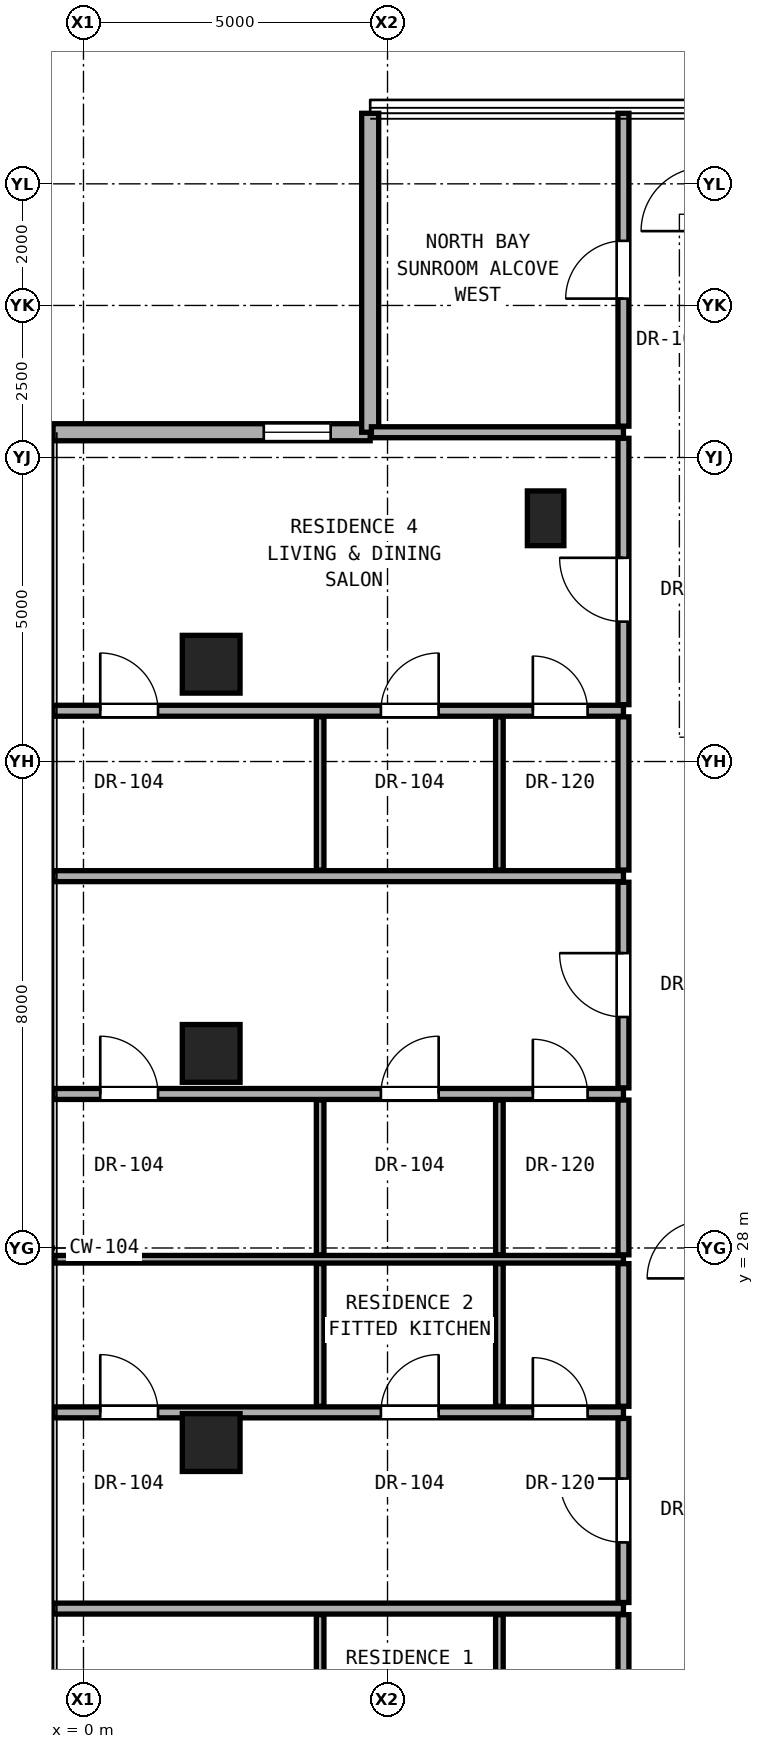
"""IFC4 building model, lengths in metres.
Left out: names, types, materials, properties, quantities, classifications, styles, units other than length and angle.
Written with IfcOpenShell. Run it as: python <this file> out.ifc"""

import sys

from ifc_helpers import new_model, si_unit, direction, frame, frame_2d, origin, origin_2d, place, context, subcontext, project, spatial, rectangle, hollow_rectangle, extrude, element, fill, save


model = new_model("IFC4")
c1 = context("Model", 3, precision=1e-05, world=origin(), true_north=direction((0.0, 1.0)))
c2 = subcontext(c1, "Body", "Model", "MODEL_VIEW")
j1 = project(units=[si_unit("LENGTHUNIT", "METRE"), si_unit("PLANEANGLEUNIT", "RADIAN")], contexts=[c1])
p1 = place(None, origin())
s1 = spatial("IfcSite", under=j1, at=p1, CompositionType="ELEMENT")
p2 = place(p1, origin())
s2 = spatial("IfcBuilding", under=s1, at=p2, CompositionType="ELEMENT")
p3 = place(p2, frame((0.0, 0.0, 170.65)))
s3 = spatial("IfcBuildingStorey", under=s2, at=p3, CompositionType="ELEMENT", Elevation=170.65)
for number, where, z_axis, x_axis in (
    (1, (2.1, 24.8, 0.0), (0.0, 0.0, 1.0), (1.0, 0.0, 0.0)),
    (2, (2.1, 31.2, 0.0), (0.0, 0.0, 1.0), (1.0, 0.0, 0.0)),
    (3, (2.1, 37.6, 0.0), (0.0, 0.0, 1.0), (1.0, 0.0, 0.0)),
):
    element("IfcColumn", number, at=place(p3, frame(where, z_axis=z_axis, x_axis=x_axis)), inside=s3, PredefinedType="COLUMN", context=c2, shape_type="SweptSolid", body=[
        extrude(hollow_rectangle(XDim=0.95, YDim=0.95, WallThickness=0.05, at=origin_2d()), origin(), (0.0, 0.0, 1.0), 3.25),
    ])
p4 = place(p3, frame((7.6, 40.0, 0.0), z_axis=(0.0, 0.0, 1.0), x_axis=(1.0, 0.0, 0.0)))
e4 = element("IfcColumn", 4, at=p4, inside=s3, PredefinedType="PILASTER", context=c2, shape_type="SweptSolid", body=[
    extrude(rectangle(XDim=0.6, YDim=0.9, at=origin_2d()), origin(), (0.0, 0.0, 1.0), 3.25),
])
p5 = place(p3, frame((4.715, 41.415, 0.0), z_axis=(0.0, 0.0, 1.0), x_axis=(-1.0, 0.0, 0.0)))
e5 = element("IfcWall", 5, at=p5, inside=s3, PredefinedType="SOLIDWALL", context=c2, shape_type="SweptSolid", body=[
    extrude(rectangle(XDim=5.245, YDim=0.28, at=frame_2d((2.623, 0.0))), origin(), (0.0, 0.0, 1.0), 3.03),
])
p6 = place(p5, frame((0.65, 0.0, 0.85)))
e6 = element("IfcOpeningElement", 6, at=p6, cuts=e5, PredefinedType="OPENING", context=c2, shape_type="SweptSolid", body=[
    extrude(rectangle(XDim=1.1, YDim=2.0, at=frame_2d((0.55, 1.0))), frame((0.0, 0.15, 0.0), z_axis=(0.0, -1.0, 0.0), x_axis=(1.0, 0.0, 0.0)), (0.0, 0.0, 1.0), 0.3),
])
p7 = place(p3, frame((4.715, 46.66, 0.0), z_axis=(0.0, 0.0, 1.0), x_axis=(0.0, -1.0, 0.0)))
e7 = element("IfcWall", 7, at=p7, inside=s3, PredefinedType="SOLIDWALL", context=c2, shape_type="SweptSolid", body=[
    extrude(rectangle(XDim=5.245, YDim=0.28, at=frame_2d((2.623, 0.0))), origin(), (0.0, 0.0, 1.0), 3.03),
])
p8 = place(p3, frame((-0.53, 22.07, 0.0), z_axis=(0.0, 0.0, 1.0), x_axis=(1.0, 0.0, 0.0)))
e8 = element("IfcWall", 8, at=p8, inside=s3, PredefinedType="PARTITIONING", context=c2, shape_type="SweptSolid", body=[
    extrude(rectangle(XDim=9.41, YDim=0.18, at=frame_2d((4.705, 0.0))), origin(), (0.0, 0.0, 1.0), 2.269),
])
p9 = place(p3, frame((-0.53, 25.297, 0.0), z_axis=(0.0, 0.0, 1.0), x_axis=(1.0, 0.0, 0.0)))
e9 = element("IfcWall", 9, at=p9, inside=s3, PredefinedType="PARTITIONING", context=c2, shape_type="SweptSolid", body=[
    extrude(rectangle(XDim=9.41, YDim=0.18, at=frame_2d((4.705, 0.0))), origin(), (0.0, 0.0, 1.0), 2.269),
])
p10 = place(p9, frame((0.806, 0.0, 0.0)))
e10 = element("IfcOpeningElement", 10, at=p10, cuts=e9, PredefinedType="OPENING", context=c2, shape_type="SweptSolid", body=[
    extrude(rectangle(XDim=0.95, YDim=2.15, at=frame_2d((0.475, 1.075))), frame((0.0, 0.1, 0.0), z_axis=(0.0, -1.0, 0.0), x_axis=(1.0, 0.0, 0.0)), (0.0, 0.0, 1.0), 0.2),
])
p11 = place(p9, frame((5.421, 0.0, 0.0)))
e11 = element("IfcOpeningElement", 11, at=p11, cuts=e9, PredefinedType="OPENING", context=c2, shape_type="SweptSolid", body=[
    extrude(rectangle(XDim=0.95, YDim=2.15, at=frame_2d((0.475, 1.075))), frame((0.0, 0.1, 0.0), z_axis=(0.0, -1.0, 0.0), x_axis=(1.0, 0.0, 0.0)), (0.0, 0.0, 1.0), 0.2),
])
p12 = place(p9, frame((7.92, 0.0, 0.0)))
e12 = element("IfcOpeningElement", 12, at=p12, cuts=e9, PredefinedType="OPENING", context=c2, shape_type="SweptSolid", body=[
    extrude(rectangle(XDim=0.9, YDim=2.1, at=frame_2d((0.45, 1.05))), frame((0.0, 0.1, 0.0), z_axis=(0.0, -1.0, 0.0), x_axis=(1.0, 0.0, 0.0)), (0.0, 0.0, 1.0), 0.2),
])
p13 = place(p3, frame((-0.53, 27.815, 0.0), z_axis=(0.0, 0.0, 1.0), x_axis=(1.0, 0.0, 0.0)))
e13 = element("IfcWall", 13, at=p13, inside=s3, PredefinedType="PARTITIONING", context=c2, shape_type="SweptSolid", body=[
    extrude(rectangle(XDim=9.41, YDim=0.125, at=frame_2d((4.705, 0.0))), origin(), (0.0, 0.0, 1.0), 2.269),
])
p14 = place(p3, frame((-0.53, 30.533, 0.0), z_axis=(0.0, 0.0, 1.0), x_axis=(1.0, 0.0, 0.0)))
e14 = element("IfcWall", 14, at=p14, inside=s3, PredefinedType="PARTITIONING", context=c2, shape_type="SweptSolid", body=[
    extrude(rectangle(XDim=9.41, YDim=0.18, at=frame_2d((4.705, 0.0))), origin(), (0.0, 0.0, 1.0), 2.269),
])
p15 = place(p14, frame((0.806, 0.0, 0.0)))
e15 = element("IfcOpeningElement", 15, at=p15, cuts=e14, PredefinedType="OPENING", context=c2, shape_type="SweptSolid", body=[
    extrude(rectangle(XDim=0.95, YDim=2.15, at=frame_2d((0.475, 1.075))), frame((0.0, 0.1, 0.0), z_axis=(0.0, -1.0, 0.0), x_axis=(1.0, 0.0, 0.0)), (0.0, 0.0, 1.0), 0.2),
])
p16 = place(p14, frame((5.421, 0.0, 0.0)))
e16 = element("IfcOpeningElement", 16, at=p16, cuts=e14, PredefinedType="OPENING", context=c2, shape_type="SweptSolid", body=[
    extrude(rectangle(XDim=0.95, YDim=2.15, at=frame_2d((0.475, 1.075))), frame((0.0, 0.1, 0.0), z_axis=(0.0, -1.0, 0.0), x_axis=(1.0, 0.0, 0.0)), (0.0, 0.0, 1.0), 0.2),
])
p17 = place(p14, frame((7.92, 0.0, 0.0)))
e17 = element("IfcOpeningElement", 17, at=p17, cuts=e14, PredefinedType="OPENING", context=c2, shape_type="SweptSolid", body=[
    extrude(rectangle(XDim=0.9, YDim=2.1, at=frame_2d((0.45, 1.05))), frame((0.0, 0.1, 0.0), z_axis=(0.0, -1.0, 0.0), x_axis=(1.0, 0.0, 0.0)), (0.0, 0.0, 1.0), 0.2),
])
p18 = place(p3, frame((-0.53, 34.115, 0.0), z_axis=(0.0, 0.0, 1.0), x_axis=(1.0, 0.0, 0.0)))
e18 = element("IfcWall", 18, at=p18, inside=s3, PredefinedType="PARTITIONING", context=c2, shape_type="SweptSolid", body=[
    extrude(rectangle(XDim=9.41, YDim=0.18, at=frame_2d((4.705, 0.0))), origin(), (0.0, 0.0, 1.0), 2.269),
])
p19 = place(p3, frame((-0.53, 36.835, 0.0), z_axis=(0.0, 0.0, 1.0), x_axis=(1.0, 0.0, 0.0)))
e19 = element("IfcWall", 19, at=p19, inside=s3, PredefinedType="PARTITIONING", context=c2, shape_type="SweptSolid", body=[
    extrude(rectangle(XDim=9.41, YDim=0.18, at=frame_2d((4.705, 0.0))), origin(), (0.0, 0.0, 1.0), 2.269),
])
p20 = place(p19, frame((0.806, 0.0, 0.0)))
e20 = element("IfcOpeningElement", 20, at=p20, cuts=e19, PredefinedType="OPENING", context=c2, shape_type="SweptSolid", body=[
    extrude(rectangle(XDim=0.95, YDim=2.15, at=frame_2d((0.475, 1.075))), frame((0.0, 0.1, 0.0), z_axis=(0.0, -1.0, 0.0), x_axis=(1.0, 0.0, 0.0)), (0.0, 0.0, 1.0), 0.2),
])
p21 = place(p19, frame((5.421, 0.0, 0.0)))
e21 = element("IfcOpeningElement", 21, at=p21, cuts=e19, PredefinedType="OPENING", context=c2, shape_type="SweptSolid", body=[
    extrude(rectangle(XDim=0.95, YDim=2.15, at=frame_2d((0.475, 1.075))), frame((0.0, 0.1, 0.0), z_axis=(0.0, -1.0, 0.0), x_axis=(1.0, 0.0, 0.0)), (0.0, 0.0, 1.0), 0.2),
])
p22 = place(p19, frame((7.92, 0.0, 0.0)))
e22 = element("IfcOpeningElement", 22, at=p22, cuts=e19, PredefinedType="OPENING", context=c2, shape_type="SweptSolid", body=[
    extrude(rectangle(XDim=0.9, YDim=2.1, at=frame_2d((0.45, 1.05))), frame((0.0, 0.1, 0.0), z_axis=(0.0, -1.0, 0.0), x_axis=(1.0, 0.0, 0.0)), (0.0, 0.0, 1.0), 0.2),
])
p23 = place(p3, frame((4.735, 41.415, 0.0), z_axis=(0.0, 0.0, 1.0), x_axis=(1.0, 0.0, 0.0)))
e23 = element("IfcWall", 23, at=p23, inside=s3, PredefinedType="PARTITIONING", context=c2, shape_type="SweptSolid", body=[
    extrude(rectangle(XDim=4.145, YDim=0.18, at=frame_2d((2.072, 0.0))), origin(), (0.0, 0.0, 1.0), 3.05),
])
p24 = place(p3, frame((3.892, 19.45, 0.0), z_axis=(0.0, 0.0, 1.0), x_axis=(0.0, 1.0, 0.0)))
e24 = element("IfcWall", 24, at=p24, inside=s3, PredefinedType="PARTITIONING", context=c2, shape_type="SweptSolid", body=[
    extrude(rectangle(XDim=2.52, YDim=0.125, at=frame_2d((1.26, 0.0))), origin(), (0.0, 0.0, 1.0), 3.05),
])
p25 = place(p3, frame((3.892, 25.397, 0.0), z_axis=(0.0, 0.0, 1.0), x_axis=(0.0, 1.0, 0.0)))
e25 = element("IfcWall", 25, at=p25, inside=s3, PredefinedType="PARTITIONING", context=c2, shape_type="SweptSolid", body=[
    extrude(rectangle(XDim=2.345, YDim=0.125, at=frame_2d((1.173, 0.0))), origin(), (0.0, 0.0, 1.0), 3.05),
])
p26 = place(p3, frame((3.892, 27.887, 0.0), z_axis=(0.0, 0.0, 1.0), x_axis=(0.0, 1.0, 0.0)))
e26 = element("IfcWall", 26, at=p26, inside=s3, PredefinedType="PARTITIONING", context=c2, shape_type="SweptSolid", body=[
    extrude(rectangle(XDim=2.546, YDim=0.125, at=frame_2d((1.273, 0.0))), origin(), (0.0, 0.0, 1.0), 3.05),
])
for number, where, z_axis, x_axis in (
    (27, (3.892, 34.215, 0.0), (0.0, 0.0, 1.0), (0.0, 1.0, 0.0)),
    (28, (6.84, 19.45, 0.0), (0.0, 0.0, 1.0), (0.0, 1.0, 0.0)),
):
    element("IfcWall", number, at=place(p3, frame(where, z_axis=z_axis, x_axis=x_axis)), inside=s3, PredefinedType="PARTITIONING", context=c2, shape_type="SweptSolid", body=[
        extrude(rectangle(XDim=2.52, YDim=0.125, at=frame_2d((1.26, 0.0))), origin(), (0.0, 0.0, 1.0), 3.05),
    ])
p27 = place(p3, frame((6.84, 25.397, 0.0), z_axis=(0.0, 0.0, 1.0), x_axis=(0.0, 1.0, 0.0)))
e29 = element("IfcWall", 29, at=p27, inside=s3, PredefinedType="PARTITIONING", context=c2, shape_type="SweptSolid", body=[
    extrude(rectangle(XDim=2.345, YDim=0.125, at=frame_2d((1.173, 0.0))), origin(), (0.0, 0.0, 1.0), 3.05),
])
p28 = place(p3, frame((6.84, 27.887, 0.0), z_axis=(0.0, 0.0, 1.0), x_axis=(0.0, 1.0, 0.0)))
e30 = element("IfcWall", 30, at=p28, inside=s3, PredefinedType="PARTITIONING", context=c2, shape_type="SweptSolid", body=[
    extrude(rectangle(XDim=2.546, YDim=0.125, at=frame_2d((1.273, 0.0))), origin(), (0.0, 0.0, 1.0), 3.05),
])
p29 = place(p3, frame((6.84, 34.215, 0.0), z_axis=(0.0, 0.0, 1.0), x_axis=(0.0, 1.0, 0.0)))
e31 = element("IfcWall", 31, at=p29, inside=s3, PredefinedType="PARTITIONING", context=c2, shape_type="SweptSolid", body=[
    extrude(rectangle(XDim=2.52, YDim=0.125, at=frame_2d((1.26, 0.0))), origin(), (0.0, 0.0, 1.0), 3.05),
])
p30 = place(p3, frame((8.88, 19.45, 0.0), z_axis=(0.0, 0.0, 1.0), x_axis=(0.0, 1.0, 0.0)))
e32 = element("IfcWall", 32, at=p30, inside=s3, PredefinedType="PARTITIONING", context=c2, shape_type="SweptSolid", body=[
    extrude(rectangle(XDim=2.52, YDim=0.18, at=frame_2d((1.26, 0.0))), origin(), (0.0, 0.0, 1.0), 3.05),
])
p31 = place(p3, frame((8.88, 22.17, 0.0), z_axis=(0.0, 0.0, 1.0), x_axis=(0.0, 1.0, 0.0)))
e33 = element("IfcWall", 33, at=p31, inside=s3, PredefinedType="PARTITIONING", context=c2, shape_type="SweptSolid", body=[
    extrude(rectangle(XDim=3.027, YDim=0.18, at=frame_2d((1.514, 0.0))), origin(), (0.0, 0.0, 1.0), 2.346),
])
p32 = place(p31, frame((0.989, 0.0, 0.0)))
e34 = element("IfcOpeningElement", 34, at=p32, cuts=e33, PredefinedType="OPENING", context=c2, shape_type="SweptSolid", body=[
    extrude(rectangle(XDim=1.05, YDim=2.2, at=frame_2d((0.525, 1.1))), frame((0.0, 0.1, 0.0), z_axis=(0.0, -1.0, 0.0), x_axis=(1.0, 0.0, 0.0)), (0.0, 0.0, 1.0), 0.2),
])
p33 = place(p3, frame((8.88, 25.397, 0.0), z_axis=(0.0, 0.0, 1.0), x_axis=(0.0, 1.0, 0.0)))
e35 = element("IfcWall", 35, at=p33, inside=s3, PredefinedType="PARTITIONING", context=c2, shape_type="SweptSolid", body=[
    extrude(rectangle(XDim=2.345, YDim=0.18, at=frame_2d((1.173, 0.0))), origin(), (0.0, 0.0, 1.0), 3.05),
])
p34 = place(p3, frame((8.88, 27.887, 0.0), z_axis=(0.0, 0.0, 1.0), x_axis=(0.0, 1.0, 0.0)))
e36 = element("IfcWall", 36, at=p34, inside=s3, PredefinedType="PARTITIONING", context=c2, shape_type="SweptSolid", body=[
    extrude(rectangle(XDim=2.546, YDim=0.18, at=frame_2d((1.273, 0.0))), origin(), (0.0, 0.0, 1.0), 3.05),
])
p35 = place(p3, frame((8.88, 30.633, 0.0), z_axis=(0.0, 0.0, 1.0), x_axis=(0.0, 1.0, 0.0)))
e37 = element("IfcWall", 37, at=p35, inside=s3, PredefinedType="PARTITIONING", context=c2, shape_type="SweptSolid", body=[
    extrude(rectangle(XDim=3.382, YDim=0.18, at=frame_2d((1.691, 0.0))), origin(), (0.0, 0.0, 1.0), 2.346),
])
p36 = place(p35, frame((1.166, 0.0, 0.0)))
e38 = element("IfcOpeningElement", 38, at=p36, cuts=e37, PredefinedType="OPENING", context=c2, shape_type="SweptSolid", body=[
    extrude(rectangle(XDim=1.05, YDim=2.2, at=frame_2d((0.525, 1.1))), frame((0.0, 0.1, 0.0), z_axis=(0.0, -1.0, 0.0), x_axis=(1.0, 0.0, 0.0)), (0.0, 0.0, 1.0), 0.2),
])
p37 = place(p3, frame((8.88, 34.215, 0.0), z_axis=(0.0, 0.0, 1.0), x_axis=(0.0, 1.0, 0.0)))
e39 = element("IfcWall", 39, at=p37, inside=s3, PredefinedType="PARTITIONING", context=c2, shape_type="SweptSolid", body=[
    extrude(rectangle(XDim=2.52, YDim=0.18, at=frame_2d((1.26, 0.0))), origin(), (0.0, 0.0, 1.0), 3.05),
])
p38 = place(p3, frame((8.88, 36.935, 0.0), z_axis=(0.0, 0.0, 1.0), x_axis=(0.0, 1.0, 0.0)))
e40 = element("IfcWall", 40, at=p38, inside=s3, PredefinedType="PARTITIONING", context=c2, shape_type="SweptSolid", body=[
    extrude(rectangle(XDim=4.38, YDim=0.18, at=frame_2d((2.19, 0.0))), origin(), (0.0, 0.0, 1.0), 2.442),
])
p39 = place(p38, frame((1.365, 0.0, 0.0)))
e41 = element("IfcOpeningElement", 41, at=p39, cuts=e40, PredefinedType="OPENING", context=c2, shape_type="SweptSolid", body=[
    extrude(rectangle(XDim=1.05, YDim=2.2, at=frame_2d((0.525, 1.1))), frame((0.0, 0.1, 0.0), z_axis=(0.0, -1.0, 0.0), x_axis=(1.0, 0.0, 0.0)), (0.0, 0.0, 1.0), 0.2),
])
p40 = place(p3, frame((8.88, 41.515, 0.0), z_axis=(0.0, 0.0, 1.0), x_axis=(0.0, 1.0, 0.0)))
e42 = element("IfcWall", 42, at=p40, inside=s3, PredefinedType="PARTITIONING", context=c2, shape_type="SweptSolid", body=[
    extrude(rectangle(XDim=5.145, YDim=0.18, at=frame_2d((2.573, 0.0))), origin(), (0.0, 0.0, 1.0), 3.05),
])
p41 = place(p40, frame((2.097, 0.0, 0.0)))
e43 = element("IfcOpeningElement", 43, at=p41, cuts=e42, PredefinedType="OPENING", context=c2, shape_type="SweptSolid", body=[
    extrude(rectangle(XDim=0.95, YDim=2.15, at=frame_2d((0.475, 1.075))), frame((0.0, 0.1, 0.0), z_axis=(0.0, -1.0, 0.0), x_axis=(1.0, 0.0, 0.0)), (0.0, 0.0, 1.0), 0.2),
])
p42 = place(p6, origin())
e44 = element("IfcWindow", 44, at=p42, inside=s3, PartitioningType="SINGLE_PANEL", PredefinedType="WINDOW", context=c2, shape_type="SweptSolid", body=[
    extrude(rectangle(XDim=1.1, YDim=2.0, at=frame_2d((0.55, 1.0))), frame((0.0, 0.03, 0.0), z_axis=(0.0, -1.0, 0.0), x_axis=(1.0, 0.0, 0.0)), (0.0, 0.0, 1.0), 0.06),
])
fill(e6, e44)
p43 = place(p32, origin())
e45 = element("IfcDoor", 45, at=p43, inside=s3, OperationType="SINGLE_SWING_RIGHT", PredefinedType="DOOR", context=c2, shape_type="SweptSolid", body=[
    extrude(rectangle(XDim=1.05, YDim=2.2, at=frame_2d((0.525, 1.1))), frame((0.0, 0.025, 0.0), z_axis=(0.0, -1.0, 0.0), x_axis=(1.0, 0.0, 0.0)), (0.0, 0.0, 1.0), 0.05),
])
fill(e34, e45)
p44 = place(p10, origin())
e46 = element("IfcDoor", 46, at=p44, inside=s3, OperationType="SINGLE_SWING_LEFT", PredefinedType="DOOR", context=c2, shape_type="SweptSolid", body=[
    extrude(rectangle(XDim=0.95, YDim=2.15, at=frame_2d((0.475, 1.075))), frame((0.0, 0.025, 0.0), z_axis=(0.0, -1.0, 0.0), x_axis=(1.0, 0.0, 0.0)), (0.0, 0.0, 1.0), 0.05),
])
fill(e10, e46)
p45 = place(p11, origin())
e47 = element("IfcDoor", 47, at=p45, inside=s3, OperationType="SINGLE_SWING_RIGHT", PredefinedType="DOOR", context=c2, shape_type="SweptSolid", body=[
    extrude(rectangle(XDim=0.95, YDim=2.15, at=frame_2d((0.475, 1.075))), frame((0.0, 0.025, 0.0), z_axis=(0.0, -1.0, 0.0), x_axis=(1.0, 0.0, 0.0)), (0.0, 0.0, 1.0), 0.05),
])
fill(e11, e47)
p46 = place(p12, origin())
e48 = element("IfcDoor", 48, at=p46, inside=s3, OperationType="SINGLE_SWING_LEFT", PredefinedType="DOOR", context=c2, shape_type="SweptSolid", body=[
    extrude(rectangle(XDim=0.9, YDim=2.1, at=frame_2d((0.45, 1.05))), frame((0.0, 0.025, 0.0), z_axis=(0.0, -1.0, 0.0), x_axis=(1.0, 0.0, 0.0)), (0.0, 0.0, 1.0), 0.05),
])
fill(e12, e48)
p47 = place(p36, origin())
e49 = element("IfcDoor", 49, at=p47, inside=s3, OperationType="SINGLE_SWING_RIGHT", PredefinedType="DOOR", context=c2, shape_type="SweptSolid", body=[
    extrude(rectangle(XDim=1.05, YDim=2.2, at=frame_2d((0.525, 1.1))), frame((0.0, 0.025, 0.0), z_axis=(0.0, -1.0, 0.0), x_axis=(1.0, 0.0, 0.0)), (0.0, 0.0, 1.0), 0.05),
])
fill(e38, e49)
p48 = place(p15, origin())
e50 = element("IfcDoor", 50, at=p48, inside=s3, OperationType="SINGLE_SWING_LEFT", PredefinedType="DOOR", context=c2, shape_type="SweptSolid", body=[
    extrude(rectangle(XDim=0.95, YDim=2.15, at=frame_2d((0.475, 1.075))), frame((0.0, 0.025, 0.0), z_axis=(0.0, -1.0, 0.0), x_axis=(1.0, 0.0, 0.0)), (0.0, 0.0, 1.0), 0.05),
])
fill(e15, e50)
p49 = place(p16, origin())
e51 = element("IfcDoor", 51, at=p49, inside=s3, OperationType="SINGLE_SWING_RIGHT", PredefinedType="DOOR", context=c2, shape_type="SweptSolid", body=[
    extrude(rectangle(XDim=0.95, YDim=2.15, at=frame_2d((0.475, 1.075))), frame((0.0, 0.025, 0.0), z_axis=(0.0, -1.0, 0.0), x_axis=(1.0, 0.0, 0.0)), (0.0, 0.0, 1.0), 0.05),
])
fill(e16, e51)
p50 = place(p17, origin())
e52 = element("IfcDoor", 52, at=p50, inside=s3, OperationType="SINGLE_SWING_LEFT", PredefinedType="DOOR", context=c2, shape_type="SweptSolid", body=[
    extrude(rectangle(XDim=0.9, YDim=2.1, at=frame_2d((0.45, 1.05))), frame((0.0, 0.025, 0.0), z_axis=(0.0, -1.0, 0.0), x_axis=(1.0, 0.0, 0.0)), (0.0, 0.0, 1.0), 0.05),
])
fill(e17, e52)
p51 = place(p39, origin())
e53 = element("IfcDoor", 53, at=p51, inside=s3, OperationType="SINGLE_SWING_RIGHT", PredefinedType="DOOR", context=c2, shape_type="SweptSolid", body=[
    extrude(rectangle(XDim=1.05, YDim=2.2, at=frame_2d((0.525, 1.1))), frame((0.0, 0.025, 0.0), z_axis=(0.0, -1.0, 0.0), x_axis=(1.0, 0.0, 0.0)), (0.0, 0.0, 1.0), 0.05),
])
fill(e41, e53)
p52 = place(p20, origin())
e54 = element("IfcDoor", 54, at=p52, inside=s3, OperationType="SINGLE_SWING_LEFT", PredefinedType="DOOR", context=c2, shape_type="SweptSolid", body=[
    extrude(rectangle(XDim=0.95, YDim=2.15, at=frame_2d((0.475, 1.075))), frame((0.0, 0.025, 0.0), z_axis=(0.0, -1.0, 0.0), x_axis=(1.0, 0.0, 0.0)), (0.0, 0.0, 1.0), 0.05),
])
fill(e20, e54)
p53 = place(p21, origin())
e55 = element("IfcDoor", 55, at=p53, inside=s3, OperationType="SINGLE_SWING_RIGHT", PredefinedType="DOOR", context=c2, shape_type="SweptSolid", body=[
    extrude(rectangle(XDim=0.95, YDim=2.15, at=frame_2d((0.475, 1.075))), frame((0.0, 0.025, 0.0), z_axis=(0.0, -1.0, 0.0), x_axis=(1.0, 0.0, 0.0)), (0.0, 0.0, 1.0), 0.05),
])
fill(e21, e55)
p54 = place(p22, origin())
e56 = element("IfcDoor", 56, at=p54, inside=s3, OperationType="SINGLE_SWING_LEFT", PredefinedType="DOOR", context=c2, shape_type="SweptSolid", body=[
    extrude(rectangle(XDim=0.9, YDim=2.1, at=frame_2d((0.45, 1.05))), frame((0.0, 0.025, 0.0), z_axis=(0.0, -1.0, 0.0), x_axis=(1.0, 0.0, 0.0)), (0.0, 0.0, 1.0), 0.05),
])
fill(e22, e56)
p55 = place(p41, origin())
e57 = element("IfcDoor", 57, at=p55, inside=s3, OperationType="SINGLE_SWING_LEFT", PredefinedType="DOOR", context=c2, shape_type="SweptSolid", body=[
    extrude(rectangle(XDim=0.95, YDim=2.15, at=frame_2d((0.475, 1.075))), frame((0.0, 0.025, 0.0), z_axis=(0.0, -1.0, 0.0), x_axis=(1.0, 0.0, 0.0)), (0.0, 0.0, 1.0), 0.05),
])
fill(e43, e57)
save(model, sys.argv[1])
